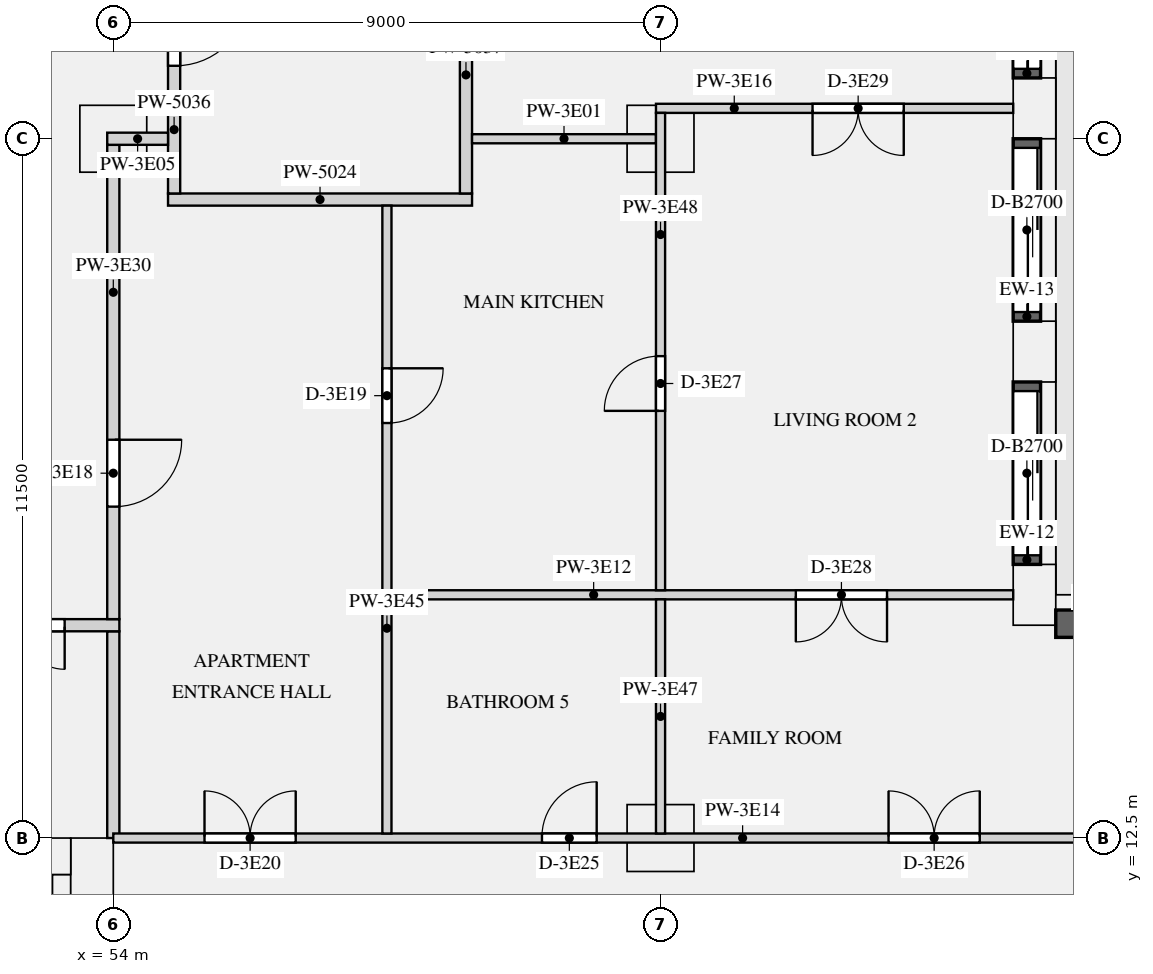
"""IFC4 building model, lengths in metres.
Left out: names, types, materials, properties, quantities, classifications, styles, units other than length and angle.
Written with IfcOpenShell. Run it as: python <this file> out.ifc"""

import sys

from ifc_helpers import new_model, si_unit, direction, frame, frame_2d, origin, origin_2d, place, context, subcontext, project, spatial, rectangle, extrude, element, fill, save


model = new_model("IFC4")
c1 = context("Model", 3, precision=1e-05, world=origin(), true_north=direction((0.0, 1.0)))
c2 = subcontext(c1, "Body", "Model", "MODEL_VIEW")
j1 = project(units=[si_unit("LENGTHUNIT", "METRE"), si_unit("PLANEANGLEUNIT", "RADIAN")], contexts=[c1])
p1 = place(None, origin())
s1 = spatial("IfcSite", under=j1, at=p1, CompositionType="ELEMENT")
p2 = place(p1, origin())
s2 = spatial("IfcBuilding", under=s1, at=p2, CompositionType="ELEMENT")
p3 = place(p2, frame((0.0, 0.0, 172.8)))
s3 = spatial("IfcBuildingStorey", under=s2, at=p3, CompositionType="ELEMENT", Elevation=172.8)
for number, where, z_axis, x_axis in (
    (1, (69.15, 16.5, 0.0), (0.0, 0.0, 1.0), (0.0, 1.0, 0.0)),
    (2, (69.15, 20.5, 0.0), (0.0, 0.0, 1.0), (0.0, 1.0, 0.0)),
    (3, (69.15, 24.5, 0.0), (0.0, 0.0, 1.0), (0.0, 1.0, 0.0)),
):
    element("IfcColumn", number, at=place(p3, frame(where, z_axis=z_axis, x_axis=x_axis)), inside=s3, PredefinedType="USERDEFINED", context=c2, shape_type="SweptSolid", body=[
        extrude(rectangle(XDim=1.0, YDim=0.7, at=origin_2d()), origin(), (0.0, 0.0, 1.0), 3.15),
    ])
for number, where, z_axis, x_axis in (
    (4, (54.0, 24.0, 0.0), (0.0, 0.0, 1.0), (1.0, 0.0, 0.0)),
    (5, (63.0, 24.0, 0.0), (0.0, 0.0, 1.0), (1.0, 0.0, 0.0)),
    (6, (63.0, 12.5, 0.0), (0.0, 0.0, 1.0), (1.0, 0.0, 0.0)),
):
    element("IfcColumn", number, at=place(p3, frame(where, z_axis=z_axis, x_axis=x_axis)), inside=s3, PredefinedType="COLUMN", context=c2, shape_type="SweptSolid", body=[
        extrude(rectangle(XDim=1.1, YDim=1.1, at=origin_2d()), origin(), (0.0, 0.0, 1.0), 3.15),
    ])
p4 = place(p3, frame((53.65, 0.0, 0.0), z_axis=(0.0, 0.0, 1.0), x_axis=(0.0, 1.0, 0.0)))
e7 = element("IfcWall", 7, at=p4, inside=s3, PredefinedType="SHEAR", context=c2, shape_type="SweptSolid", body=[
    extrude(rectangle(XDim=12.5, YDim=0.7, at=frame_2d((6.25, 0.0))), origin(), (0.0, 0.0, 1.0), 3.15),
])
p5 = place(p3, frame((18.7, 12.2, 0.0), z_axis=(0.0, 0.0, 1.0), x_axis=(1.0, 0.0, 0.0)))
e8 = element("IfcWall", 8, at=p5, inside=s3, PredefinedType="SHEAR", context=c2, shape_type="SweptSolid", body=[
    extrude(rectangle(XDim=34.6, YDim=0.6, at=frame_2d((17.3, 0.0))), origin(), (0.0, 0.0, 1.0), 3.15),
])
p6 = place(p5, frame((24.475, 0.0, 0.0)))
e9 = element("IfcOpeningElement", 9, at=p6, cuts=e8, PredefinedType="OPENING", context=c2, shape_type="SweptSolid", body=[
    extrude(rectangle(XDim=1.1, YDim=2.1, at=frame_2d((0.55, 1.05))), frame((0.0, 0.31, 0.0), z_axis=(0.0, -1.0, 0.0), x_axis=(1.0, 0.0, 0.0)), (0.0, 0.0, 1.0), 0.62),
])
p7 = place(p5, frame((26.725, 0.0, 0.0)))
e10 = element("IfcOpeningElement", 10, at=p7, cuts=e8, PredefinedType="OPENING", context=c2, shape_type="SweptSolid", body=[
    extrude(rectangle(XDim=1.1, YDim=2.1, at=frame_2d((0.55, 1.05))), frame((0.0, 0.31, 0.0), z_axis=(0.0, -1.0, 0.0), x_axis=(1.0, 0.0, 0.0)), (0.0, 0.0, 1.0), 0.62),
])
p8 = place(p5, frame((28.975, 0.0, 0.0)))
e11 = element("IfcOpeningElement", 11, at=p8, cuts=e8, PredefinedType="OPENING", context=c2, shape_type="SweptSolid", body=[
    extrude(rectangle(XDim=1.1, YDim=2.1, at=frame_2d((0.55, 1.05))), frame((0.0, 0.31, 0.0), z_axis=(0.0, -1.0, 0.0), x_axis=(1.0, 0.0, 0.0)), (0.0, 0.0, 1.0), 0.62),
])
p9 = place(p5, frame((11.85, 0.0, 0.0)))
e12 = element("IfcOpeningElement", 12, at=p9, cuts=e8, PredefinedType="OPENING", context=c2, shape_type="SweptSolid", body=[
    extrude(rectangle(XDim=0.9, YDim=2.1, at=frame_2d((0.45, 1.05))), frame((0.0, 0.31, 0.0), z_axis=(0.0, -1.0, 0.0), x_axis=(1.0, 0.0, 0.0)), (0.0, 0.0, 1.0), 0.62),
])
p10 = place(p5, frame((18.35, 0.0, 0.0)))
e13 = element("IfcOpeningElement", 13, at=p10, cuts=e8, PredefinedType="OPENING", context=c2, shape_type="SweptSolid", body=[
    extrude(rectangle(XDim=0.9, YDim=2.1, at=frame_2d((0.45, 1.05))), frame((0.0, 0.31, 0.0), z_axis=(0.0, -1.0, 0.0), x_axis=(1.0, 0.0, 0.0)), (0.0, 0.0, 1.0), 0.62),
])
p11 = place(p5, frame((1.45, 0.0, 0.0)))
e14 = element("IfcOpeningElement", 14, at=p11, cuts=e8, PredefinedType="OPENING", context=c2, shape_type="SweptSolid", body=[
    extrude(rectangle(XDim=1.2, YDim=2.1, at=frame_2d((0.6, 1.05))), frame((0.0, 0.31, 0.0), z_axis=(0.0, -1.0, 0.0), x_axis=(1.0, 0.0, 0.0)), (0.0, 0.0, 1.0), 0.62),
])
p12 = place(p5, frame((31.95, 0.0, 0.0)))
e15 = element("IfcOpeningElement", 15, at=p12, cuts=e8, PredefinedType="OPENING", context=c2, shape_type="SweptSolid", body=[
    extrude(rectangle(XDim=1.2, YDim=2.1, at=frame_2d((0.6, 1.05))), frame((0.0, 0.31, 0.0), z_axis=(0.0, -1.0, 0.0), x_axis=(1.0, 0.0, 0.0)), (0.0, 0.0, 1.0), 0.62),
])
p13 = place(p3, frame((53.15, 1.0, 0.0), z_axis=(0.0, 0.0, 1.0), x_axis=(0.0, 1.0, 0.0)))
e16 = element("IfcWall", 16, at=p13, inside=s3, PredefinedType="SHEAR", context=c2, shape_type="SweptSolid", body=[
    extrude(rectangle(XDim=10.9, YDim=0.3, at=frame_2d((5.45, 0.0))), origin(), (0.0, 0.0, 1.0), 3.15),
])
p14 = place(p3, frame((71.0, 16.025, 0.9), z_axis=(0.0, 0.0, 1.0), x_axis=(-1.0, 0.0, 0.0)))
e17 = element("IfcWall", 17, at=p14, inside=s3, PredefinedType="SOLIDWALL", context=c2, shape_type="SweptSolid", body=[
    extrude(rectangle(XDim=1.5, YDim=0.45, at=frame_2d((0.75, 0.0))), origin(), (0.0, 0.0, 1.0), 1.93),
])
p15 = place(p3, frame((69.025, 17.0, 0.0), z_axis=(0.0, 0.0, 1.0), x_axis=(0.0, 1.0, 0.0)))
e18 = element("IfcWall", 18, at=p15, inside=s3, PredefinedType="SOLIDWALL", context=c2, shape_type="SweptSolid", body=[
    extrude(rectangle(XDim=3.0, YDim=0.45, at=frame_2d((1.5, 0.0))), origin(), (0.0, 0.0, 1.0), 2.83),
])
p16 = place(p15, frame((0.15, 0.0, 0.0)))
e19 = element("IfcOpeningElement", 19, at=p16, cuts=e18, PredefinedType="OPENING", context=c2, shape_type="SweptSolid", body=[
    extrude(rectangle(XDim=2.7, YDim=2.3, at=frame_2d((1.35, 1.15))), frame((0.0, 0.235, 0.0), z_axis=(0.0, -1.0, 0.0), x_axis=(1.0, 0.0, 0.0)), (0.0, 0.0, 1.0), 0.47),
])
p17 = place(p3, frame((69.025, 21.0, 0.0), z_axis=(0.0, 0.0, 1.0), x_axis=(0.0, 1.0, 0.0)))
e20 = element("IfcWall", 20, at=p17, inside=s3, PredefinedType="SOLIDWALL", context=c2, shape_type="SweptSolid", body=[
    extrude(rectangle(XDim=3.0, YDim=0.45, at=frame_2d((1.5, 0.0))), origin(), (0.0, 0.0, 1.0), 2.83),
])
p18 = place(p17, frame((0.15, 0.0, 0.0)))
e21 = element("IfcOpeningElement", 21, at=p18, cuts=e20, PredefinedType="OPENING", context=c2, shape_type="SweptSolid", body=[
    extrude(rectangle(XDim=2.7, YDim=2.3, at=frame_2d((1.35, 1.15))), frame((0.0, 0.235, 0.0), z_axis=(0.0, -1.0, 0.0), x_axis=(1.0, 0.0, 0.0)), (0.0, 0.0, 1.0), 0.47),
])
p19 = place(p3, frame((69.025, 25.0, 0.0), z_axis=(0.0, 0.0, 1.0), x_axis=(0.0, 1.0, 0.0)))
e22 = element("IfcWall", 22, at=p19, inside=s3, PredefinedType="SOLIDWALL", context=c2, shape_type="SweptSolid", body=[
    extrude(rectangle(XDim=3.5, YDim=0.45, at=frame_2d((1.75, 0.0))), origin(), (0.0, 0.0, 1.0), 2.83),
])
p20 = place(p19, frame((0.15, 0.0, 0.0)))
e23 = element("IfcOpeningElement", 23, at=p20, cuts=e22, PredefinedType="OPENING", context=c2, shape_type="SweptSolid", body=[
    extrude(rectangle(XDim=3.2, YDim=2.3, at=frame_2d((1.6, 1.15))), frame((0.0, 0.235, 0.0), z_axis=(0.0, -1.0, 0.0), x_axis=(1.0, 0.0, 0.0)), (0.0, 0.0, 1.0), 0.47),
])
p21 = place(p3, frame((54.9, 23.0, 0.0), z_axis=(0.0, 0.0, 1.0), x_axis=(1.0, 0.0, 0.0)))
e24 = element("IfcWall", 24, at=p21, inside=s3, PredefinedType="PARTITIONING", context=c2, shape_type="SweptSolid", body=[
    extrude(rectangle(XDim=5.0, YDim=0.2, at=frame_2d((2.5, 0.0))), origin(), (0.0, 0.0, 1.0), 2.83),
])
p22 = place(p3, frame((54.0, 12.5, 0.0), z_axis=(0.0, 0.0, 1.0), x_axis=(0.0, 1.0, 0.0)))
e25 = element("IfcWall", 25, at=p22, inside=s3, PredefinedType="PARTITIONING", context=c2, shape_type="SweptSolid", body=[
    extrude(rectangle(XDim=3.4, YDim=0.2, at=frame_2d((1.7, 0.0))), origin(), (0.0, 0.0, 1.0), 2.83),
])
p23 = place(p3, frame((55.0, 23.1, 0.0), z_axis=(0.0, 0.0, 1.0), x_axis=(0.0, 1.0, 0.0)))
e26 = element("IfcWall", 26, at=p23, inside=s3, PredefinedType="PARTITIONING", context=c2, shape_type="SweptSolid", body=[
    extrude(rectangle(XDim=3.8, YDim=0.2, at=frame_2d((1.9, 0.0))), origin(), (0.0, 0.0, 1.0), 2.83),
])
p24 = place(p23, frame((2.1, 0.0, 0.0)))
e27 = element("IfcOpeningElement", 27, at=p24, cuts=e26, PredefinedType="OPENING", context=c2, shape_type="SweptSolid", body=[
    extrude(rectangle(XDim=1.2, YDim=2.1, at=frame_2d((0.6, 1.05))), frame((0.0, 0.11, 0.0), z_axis=(0.0, -1.0, 0.0), x_axis=(1.0, 0.0, 0.0)), (0.0, 0.0, 1.0), 0.22),
])
p25 = place(p3, frame((59.8, 23.1, 0.0), z_axis=(0.0, 0.0, 1.0), x_axis=(0.0, 1.0, 0.0)))
e28 = element("IfcWall", 28, at=p25, inside=s3, PredefinedType="PARTITIONING", context=c2, shape_type="SweptSolid", body=[
    extrude(rectangle(XDim=3.9, YDim=0.2, at=frame_2d((1.95, 0.0))), origin(), (0.0, 0.0, 1.0), 2.83),
])
p26 = place(p3, frame((59.9, 24.0, 0.0), z_axis=(0.0, 0.0, 1.0), x_axis=(1.0, 0.0, 0.0)))
e29 = element("IfcWall", 29, at=p26, inside=s3, PredefinedType="PARTITIONING", context=c2, shape_type="SweptSolid", body=[
    extrude(rectangle(XDim=3.025, YDim=0.15, at=frame_2d((1.513, 0.0))), origin(), (0.0, 0.0, 1.0), 2.83),
])
p27 = place(p3, frame((53.9, 24.0, 0.0), z_axis=(0.0, 0.0, 1.0), x_axis=(1.0, 0.0, 0.0)))
e30 = element("IfcWall", 30, at=p27, inside=s3, PredefinedType="PARTITIONING", context=c2, shape_type="SweptSolid", body=[
    extrude(rectangle(XDim=1.0, YDim=0.2, at=frame_2d((0.5, 0.0))), origin(), (0.0, 0.0, 1.0), 2.83),
])
p28 = place(p3, frame((58.575, 16.5, 0.0), z_axis=(0.0, 0.0, 1.0), x_axis=(1.0, 0.0, 0.0)))
e31 = element("IfcWall", 31, at=p28, inside=s3, PredefinedType="PARTITIONING", context=c2, shape_type="SweptSolid", body=[
    extrude(rectangle(XDim=10.225, YDim=0.15, at=frame_2d((5.113, 0.0))), origin(), (0.0, 0.0, 1.0), 2.83),
])
p29 = place(p28, frame((6.65, 0.0, 0.0)))
e32 = element("IfcOpeningElement", 32, at=p29, cuts=e31, PredefinedType="OPENING", context=c2, shape_type="SweptSolid", body=[
    extrude(rectangle(XDim=1.5, YDim=2.1, at=frame_2d((0.75, 1.05))), frame((0.0, 0.085, 0.0), z_axis=(0.0, -1.0, 0.0), x_axis=(1.0, 0.0, 0.0)), (0.0, 0.0, 1.0), 0.17),
])
p30 = place(p3, frame((54.0, 12.5, 0.0), z_axis=(0.0, 0.0, 1.0), x_axis=(1.0, 0.0, 0.0)))
e33 = element("IfcWall", 33, at=p30, inside=s3, PredefinedType="PARTITIONING", context=c2, shape_type="SweptSolid", body=[
    extrude(rectangle(XDim=17.3, YDim=0.15, at=frame_2d((8.65, 0.0))), origin(), (0.0, 0.0, 1.0), 2.83),
])
p31 = place(p30, frame((1.5, 0.0, 0.0)))
e34 = element("IfcOpeningElement", 34, at=p31, cuts=e33, PredefinedType="OPENING", context=c2, shape_type="SweptSolid", body=[
    extrude(rectangle(XDim=1.5, YDim=2.1, at=frame_2d((0.75, 1.05))), frame((0.0, 0.085, 0.0), z_axis=(0.0, -1.0, 0.0), x_axis=(1.0, 0.0, 0.0)), (0.0, 0.0, 1.0), 0.17),
])
p32 = place(p30, frame((7.05, 0.0, 0.0)))
e35 = element("IfcOpeningElement", 35, at=p32, cuts=e33, PredefinedType="OPENING", context=c2, shape_type="SweptSolid", body=[
    extrude(rectangle(XDim=0.9, YDim=2.1, at=frame_2d((0.45, 1.05))), frame((0.0, 0.085, 0.0), z_axis=(0.0, -1.0, 0.0), x_axis=(1.0, 0.0, 0.0)), (0.0, 0.0, 1.0), 0.17),
])
p33 = place(p30, frame((12.75, 0.0, 0.0)))
e36 = element("IfcOpeningElement", 36, at=p33, cuts=e33, PredefinedType="OPENING", context=c2, shape_type="SweptSolid", body=[
    extrude(rectangle(XDim=1.5, YDim=2.1, at=frame_2d((0.75, 1.05))), frame((0.0, 0.085, 0.0), z_axis=(0.0, -1.0, 0.0), x_axis=(1.0, 0.0, 0.0)), (0.0, 0.0, 1.0), 0.17),
])
p34 = place(p3, frame((62.925, 24.5, 0.0), z_axis=(0.0, 0.0, 1.0), x_axis=(1.0, 0.0, 0.0)))
e37 = element("IfcWall", 37, at=p34, inside=s3, PredefinedType="PARTITIONING", context=c2, shape_type="SweptSolid", body=[
    extrude(rectangle(XDim=5.875, YDim=0.15, at=frame_2d((2.938, 0.0))), origin(), (0.0, 0.0, 1.0), 2.83),
])
p35 = place(p34, frame((2.575, 0.0, 0.0)))
e38 = element("IfcOpeningElement", 38, at=p35, cuts=e37, PredefinedType="OPENING", context=c2, shape_type="SweptSolid", body=[
    extrude(rectangle(XDim=1.5, YDim=2.1, at=frame_2d((0.75, 1.05))), frame((0.0, 0.085, 0.0), z_axis=(0.0, -1.0, 0.0), x_axis=(1.0, 0.0, 0.0)), (0.0, 0.0, 1.0), 0.17),
])
p36 = place(p3, frame((17.9, 16.0, 0.0), z_axis=(0.0, 0.0, 1.0), x_axis=(1.0, 0.0, 0.0)))
e39 = element("IfcWall", 39, at=p36, inside=s3, PredefinedType="PARTITIONING", context=c2, shape_type="SweptSolid", body=[
    extrude(rectangle(XDim=36.2, YDim=0.2, at=frame_2d((18.1, 0.0))), origin(), (0.0, 0.0, 1.0), 2.83),
])
p37 = place(p36, frame((0.9, 0.0, 0.0)))
e40 = element("IfcOpeningElement", 40, at=p37, cuts=e39, PredefinedType="OPENING", context=c2, shape_type="SweptSolid", body=[
    extrude(rectangle(XDim=1.4, YDim=2.1, at=frame_2d((0.7, 1.05))), frame((0.0, 0.11, 0.0), z_axis=(0.0, -1.0, 0.0), x_axis=(1.0, 0.0, 0.0)), (0.0, 0.0, 1.0), 0.22),
])
p38 = place(p36, frame((33.9, 0.0, 0.0)))
e41 = element("IfcOpeningElement", 41, at=p38, cuts=e39, PredefinedType="OPENING", context=c2, shape_type="SweptSolid", body=[
    extrude(rectangle(XDim=1.4, YDim=2.1, at=frame_2d((0.7, 1.05))), frame((0.0, 0.11, 0.0), z_axis=(0.0, -1.0, 0.0), x_axis=(1.0, 0.0, 0.0)), (0.0, 0.0, 1.0), 0.22),
])
p39 = place(p3, frame((54.0, 16.1, 0.0), z_axis=(0.0, 0.0, 1.0), x_axis=(0.0, 1.0, 0.0)))
e42 = element("IfcWall", 42, at=p39, inside=s3, PredefinedType="PARTITIONING", context=c2, shape_type="SweptSolid", body=[
    extrude(rectangle(XDim=7.8, YDim=0.2, at=frame_2d((3.9, 0.0))), origin(), (0.0, 0.0, 1.0), 2.83),
])
p40 = place(p39, frame((1.85, 0.0, 0.0)))
e43 = element("IfcOpeningElement", 43, at=p40, cuts=e42, PredefinedType="OPENING", context=c2, shape_type="SweptSolid", body=[
    extrude(rectangle(XDim=1.1, YDim=2.1, at=frame_2d((0.55, 1.05))), frame((0.0, 0.11, 0.0), z_axis=(0.0, -1.0, 0.0), x_axis=(1.0, 0.0, 0.0)), (0.0, 0.0, 1.0), 0.22),
])
p41 = place(p3, frame((58.5, 12.575, 0.0), z_axis=(0.0, 0.0, 1.0), x_axis=(0.0, 1.0, 0.0)))
e44 = element("IfcWall", 44, at=p41, inside=s3, PredefinedType="PARTITIONING", context=c2, shape_type="SweptSolid", body=[
    extrude(rectangle(XDim=10.325, YDim=0.15, at=frame_2d((5.163, 0.0))), origin(), (0.0, 0.0, 1.0), 2.83),
])
p42 = place(p41, frame((6.75, 0.0, 0.0)))
e45 = element("IfcOpeningElement", 45, at=p42, cuts=e44, PredefinedType="OPENING", context=c2, shape_type="SweptSolid", body=[
    extrude(rectangle(XDim=0.9, YDim=2.1, at=frame_2d((0.45, 1.05))), frame((0.0, 0.085, 0.0), z_axis=(0.0, -1.0, 0.0), x_axis=(1.0, 0.0, 0.0)), (0.0, 0.0, 1.0), 0.17),
])
p43 = place(p3, frame((63.0, 12.575, 0.0), z_axis=(0.0, 0.0, 1.0), x_axis=(0.0, 1.0, 0.0)))
e46 = element("IfcWall", 46, at=p43, inside=s3, PredefinedType="PARTITIONING", context=c2, shape_type="SweptSolid", body=[
    extrude(rectangle(XDim=3.85, YDim=0.15, at=frame_2d((1.925, 0.0))), origin(), (0.0, 0.0, 1.0), 2.83),
])
p44 = place(p3, frame((63.0, 16.575, 0.0), z_axis=(0.0, 0.0, 1.0), x_axis=(0.0, 1.0, 0.0)))
e47 = element("IfcWall", 47, at=p44, inside=s3, PredefinedType="PARTITIONING", context=c2, shape_type="SweptSolid", body=[
    extrude(rectangle(XDim=7.85, YDim=0.15, at=frame_2d((3.925, 0.0))), origin(), (0.0, 0.0, 1.0), 2.83),
])
p45 = place(p44, frame((2.95, 0.0, 0.0)))
e48 = element("IfcOpeningElement", 48, at=p45, cuts=e47, PredefinedType="OPENING", context=c2, shape_type="SweptSolid", body=[
    extrude(rectangle(XDim=0.9, YDim=2.1, at=frame_2d((0.45, 1.05))), frame((0.0, 0.085, 0.0), z_axis=(0.0, -1.0, 0.0), x_axis=(1.0, 0.0, 0.0)), (0.0, 0.0, 1.0), 0.17),
])
p46 = place(p16, origin())
e49 = element("IfcDoor", 49, at=p46, inside=s3, OperationType="SLIDING_TO_LEFT", PredefinedType="DOOR", context=c2, shape_type="SweptSolid", body=[
    extrude(rectangle(XDim=2.7, YDim=2.3, at=frame_2d((1.35, 1.15))), frame((0.0, -0.07, 0.0), z_axis=(0.0, -1.0, 0.0), x_axis=(1.0, 0.0, 0.0)), (0.0, 0.0, 1.0), 0.05),
])
fill(e19, e49)
p47 = place(p18, origin())
e50 = element("IfcDoor", 50, at=p47, inside=s3, OperationType="SLIDING_TO_LEFT", PredefinedType="DOOR", context=c2, shape_type="SweptSolid", body=[
    extrude(rectangle(XDim=2.7, YDim=2.3, at=frame_2d((1.35, 1.15))), frame((0.0, -0.07, 0.0), z_axis=(0.0, -1.0, 0.0), x_axis=(1.0, 0.0, 0.0)), (0.0, 0.0, 1.0), 0.05),
])
fill(e21, e50)
p48 = place(p20, origin())
e51 = element("IfcDoor", 51, at=p48, inside=s3, OperationType="SLIDING_TO_LEFT", PredefinedType="DOOR", context=c2, shape_type="SweptSolid", body=[
    extrude(rectangle(XDim=3.2, YDim=2.3, at=frame_2d((1.6, 1.15))), frame((0.0, -0.07, 0.0), z_axis=(0.0, -1.0, 0.0), x_axis=(1.0, 0.0, 0.0)), (0.0, 0.0, 1.0), 0.05),
])
fill(e23, e51)
p49 = place(p24, frame((1.2, 0.0, 0.0), z_axis=(0.0, 0.0, 1.0), x_axis=(-1.0, 0.0, 0.0)))
e52 = element("IfcDoor", 52, at=p49, inside=s3, OperationType="SINGLE_SWING_LEFT", PredefinedType="DOOR", context=c2, shape_type="SweptSolid", body=[
    extrude(rectangle(XDim=1.2, YDim=2.1, at=frame_2d((0.6, 1.05))), frame((0.0, 0.025, 0.0), z_axis=(0.0, -1.0, 0.0), x_axis=(1.0, 0.0, 0.0)), (0.0, 0.0, 1.0), 0.05),
])
fill(e27, e52)
p50 = place(p38, frame((1.4, 0.0, 0.0), z_axis=(0.0, 0.0, 1.0), x_axis=(-1.0, 0.0, 0.0)))
e53 = element("IfcDoor", 53, at=p50, inside=s3, OperationType="DOUBLE_DOOR_SINGLE_SWING", PredefinedType="DOOR", context=c2, shape_type="SweptSolid", body=[
    extrude(rectangle(XDim=1.4, YDim=2.1, at=frame_2d((0.7, 1.05))), frame((0.0, 0.025, 0.0), z_axis=(0.0, -1.0, 0.0), x_axis=(1.0, 0.0, 0.0)), (0.0, 0.0, 1.0), 0.05),
])
fill(e41, e53)
p51 = place(p40, frame((1.1, 0.0, 0.0), z_axis=(0.0, 0.0, 1.0), x_axis=(-1.0, 0.0, 0.0)))
e54 = element("IfcDoor", 54, at=p51, inside=s3, OperationType="SINGLE_SWING_LEFT", PredefinedType="DOOR", context=c2, shape_type="SweptSolid", body=[
    extrude(rectangle(XDim=1.1, YDim=2.1, at=frame_2d((0.55, 1.05))), frame((0.0, 0.025, 0.0), z_axis=(0.0, -1.0, 0.0), x_axis=(1.0, 0.0, 0.0)), (0.0, 0.0, 1.0), 0.05),
])
fill(e43, e54)
p52 = place(p42, frame((0.9, 0.0, 0.0), z_axis=(0.0, 0.0, 1.0), x_axis=(-1.0, 0.0, 0.0)))
e55 = element("IfcDoor", 55, at=p52, inside=s3, OperationType="SINGLE_SWING_LEFT", PredefinedType="DOOR", context=c2, shape_type="SweptSolid", body=[
    extrude(rectangle(XDim=0.9, YDim=2.1, at=frame_2d((0.45, 1.05))), frame((0.0, 0.025, 0.0), z_axis=(0.0, -1.0, 0.0), x_axis=(1.0, 0.0, 0.0)), (0.0, 0.0, 1.0), 0.05),
])
fill(e45, e55)
p53 = place(p31, origin())
e56 = element("IfcDoor", 56, at=p53, inside=s3, OperationType="DOUBLE_DOOR_SINGLE_SWING", PredefinedType="DOOR", context=c2, shape_type="SweptSolid", body=[
    extrude(rectangle(XDim=1.5, YDim=2.1, at=frame_2d((0.75, 1.05))), frame((0.0, 0.025, 0.0), z_axis=(0.0, -1.0, 0.0), x_axis=(1.0, 0.0, 0.0)), (0.0, 0.0, 1.0), 0.05),
])
fill(e34, e56)
p54 = place(p32, origin())
e57 = element("IfcDoor", 57, at=p54, inside=s3, OperationType="SINGLE_SWING_RIGHT", PredefinedType="DOOR", context=c2, shape_type="SweptSolid", body=[
    extrude(rectangle(XDim=0.9, YDim=2.1, at=frame_2d((0.45, 1.05))), frame((0.0, 0.025, 0.0), z_axis=(0.0, -1.0, 0.0), x_axis=(1.0, 0.0, 0.0)), (0.0, 0.0, 1.0), 0.05),
])
fill(e35, e57)
p55 = place(p33, origin())
e58 = element("IfcDoor", 58, at=p55, inside=s3, OperationType="DOUBLE_DOOR_SINGLE_SWING", PredefinedType="DOOR", context=c2, shape_type="SweptSolid", body=[
    extrude(rectangle(XDim=1.5, YDim=2.1, at=frame_2d((0.75, 1.05))), frame((0.0, 0.025, 0.0), z_axis=(0.0, -1.0, 0.0), x_axis=(1.0, 0.0, 0.0)), (0.0, 0.0, 1.0), 0.05),
])
fill(e36, e58)
p56 = place(p45, origin())
e59 = element("IfcDoor", 59, at=p56, inside=s3, OperationType="SINGLE_SWING_LEFT", PredefinedType="DOOR", context=c2, shape_type="SweptSolid", body=[
    extrude(rectangle(XDim=0.9, YDim=2.1, at=frame_2d((0.45, 1.05))), frame((0.0, 0.025, 0.0), z_axis=(0.0, -1.0, 0.0), x_axis=(1.0, 0.0, 0.0)), (0.0, 0.0, 1.0), 0.05),
])
fill(e48, e59)
p57 = place(p29, frame((1.5, 0.0, 0.0), z_axis=(0.0, 0.0, 1.0), x_axis=(-1.0, 0.0, 0.0)))
e60 = element("IfcDoor", 60, at=p57, inside=s3, OperationType="DOUBLE_DOOR_SINGLE_SWING", PredefinedType="DOOR", context=c2, shape_type="SweptSolid", body=[
    extrude(rectangle(XDim=1.5, YDim=2.1, at=frame_2d((0.75, 1.05))), frame((0.0, 0.025, 0.0), z_axis=(0.0, -1.0, 0.0), x_axis=(1.0, 0.0, 0.0)), (0.0, 0.0, 1.0), 0.05),
])
fill(e32, e60)
p58 = place(p35, frame((1.5, 0.0, 0.0), z_axis=(0.0, 0.0, 1.0), x_axis=(-1.0, 0.0, 0.0)))
e61 = element("IfcDoor", 61, at=p58, inside=s3, OperationType="DOUBLE_DOOR_SINGLE_SWING", PredefinedType="DOOR", context=c2, shape_type="SweptSolid", body=[
    extrude(rectangle(XDim=1.5, YDim=2.1, at=frame_2d((0.75, 1.05))), frame((0.0, 0.025, 0.0), z_axis=(0.0, -1.0, 0.0), x_axis=(1.0, 0.0, 0.0)), (0.0, 0.0, 1.0), 0.05),
])
fill(e38, e61)
save(model, sys.argv[1])
